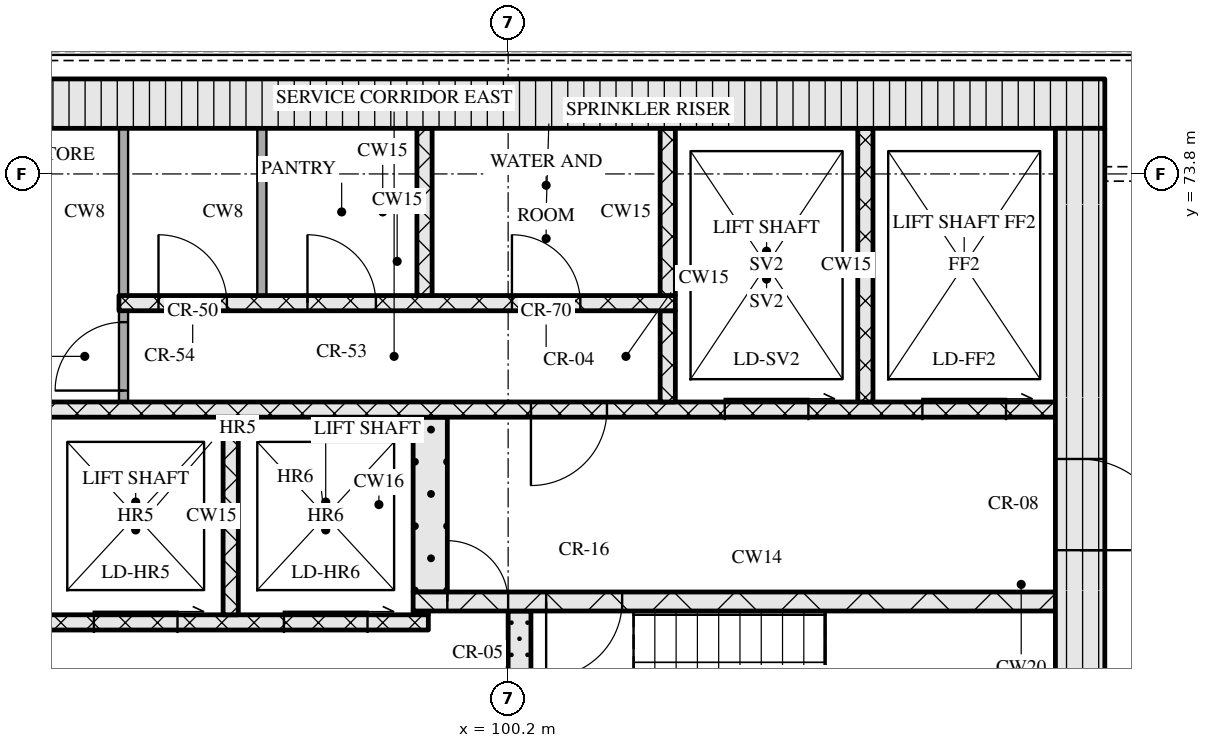
"""IFC4 building model, lengths in metres.
Left out: names, types, materials, properties, quantities, classifications, styles, units other than length and angle.
Written with IfcOpenShell. Run it as: python <this file> out.ifc"""

import sys

from ifc_helpers import new_model, si_unit, direction, frame, frame_2d, origin, place, context, subcontext, project, spatial, rectangle, extrude, element, fill, save


model = new_model("IFC4")
c1 = context("Model", 3, precision=1e-05, world=origin(), true_north=direction((0.0, 1.0)))
c2 = subcontext(c1, "Body", "Model", "MODEL_VIEW")
j1 = project(units=[si_unit("LENGTHUNIT", "METRE"), si_unit("PLANEANGLEUNIT", "RADIAN")], contexts=[c1])
p1 = place(None, origin())
s1 = spatial("IfcSite", under=j1, at=p1, CompositionType="ELEMENT")
p2 = place(p1, origin())
s2 = spatial("IfcBuilding", under=s1, at=p2, CompositionType="ELEMENT")
p3 = place(p2, frame((0.0, 0.0, 227.1)))
s3 = spatial("IfcBuildingStorey", under=s2, at=p3, CompositionType="ELEMENT", Elevation=227.1)
p4 = place(p3, frame((67.15, 74.725, 0.0), z_axis=(0.0, 0.0, 1.0), x_axis=(1.0, 0.0, 0.0)))
e1 = element("IfcWall", 1, at=p4, inside=s3, PredefinedType="SOLIDWALL", context=c2, shape_type="SweptSolid", body=[
    extrude(rectangle(XDim=40.9, YDim=0.65, at=frame_2d((20.45, 0.0))), origin(), (0.0, 0.0, 1.0), 3.32),
])
p5 = place(p3, frame((107.725, 62.4, 0.0), z_axis=(0.0, 0.0, 1.0), x_axis=(0.0, 1.0, 0.0)))
e2 = element("IfcWall", 2, at=p5, inside=s3, PredefinedType="SOLIDWALL", context=c2, shape_type="SweptSolid", body=[
    extrude(rectangle(XDim=12.0, YDim=0.65, at=frame_2d((6.0, 0.0))), origin(), (0.0, 0.0, 1.0), 3.32),
])
p6 = place(p5, frame((6.45, 0.0, 0.0)))
e3 = element("IfcOpeningElement", 3, at=p6, cuts=e2, PredefinedType="OPENING", context=c2, shape_type="SweptSolid", body=[
    extrude(rectangle(XDim=1.2, YDim=2.1, at=frame_2d((0.6, 1.05))), frame((0.0, 0.335, 0.0), z_axis=(0.0, -1.0, 0.0), x_axis=(1.0, 0.0, 0.0)), (0.0, 0.0, 1.0), 0.67),
])
p7 = place(p3, frame((100.35, 65.2, 0.0), z_axis=(0.0, 0.0, 1.0), x_axis=(0.0, 1.0, 0.0)))
e4 = element("IfcWall", 4, at=p7, inside=s3, PredefinedType="SOLIDWALL", context=c2, shape_type="SweptSolid", body=[
    extrude(rectangle(XDim=2.85, YDim=0.3, at=frame_2d((1.425, 0.0))), origin(), (0.0, 0.0, 1.0), 3.32),
])
p8 = place(p3, frame((76.05, 67.9, 0.0), z_axis=(0.0, 0.0, 1.0), x_axis=(1.0, 0.0, 0.0)))
e5 = element("IfcWall", 5, at=p8, inside=s3, PredefinedType="SOLIDWALL", context=c2, shape_type="SweptSolid", body=[
    extrude(rectangle(XDim=23.1, YDim=0.2, at=frame_2d((11.55, 0.0))), origin(), (0.0, 0.0, 1.0), 3.32),
])
p9 = place(p8, frame((1.35, 0.0, 0.0)))
e6 = element("IfcOpeningElement", 6, at=p9, cuts=e5, PredefinedType="OPENING", context=c2, shape_type="SweptSolid", body=[
    extrude(rectangle(XDim=0.9, YDim=2.1, at=frame_2d((0.45, 1.05))), frame((0.0, 0.11, 0.0), z_axis=(0.0, -1.0, 0.0), x_axis=(1.0, 0.0, 0.0)), (0.0, 0.0, 1.0), 0.22),
])
p10 = place(p8, frame((5.06, 0.0, 0.0)))
e7 = element("IfcOpeningElement", 7, at=p10, cuts=e5, PredefinedType="OPENING", context=c2, shape_type="SweptSolid", body=[
    extrude(rectangle(XDim=0.9, YDim=2.1, at=frame_2d((0.45, 1.05))), frame((0.0, 0.11, 0.0), z_axis=(0.0, -1.0, 0.0), x_axis=(1.0, 0.0, 0.0)), (0.0, 0.0, 1.0), 0.22),
])
p11 = place(p8, frame((8.45, 0.0, 0.0)))
e8 = element("IfcOpeningElement", 8, at=p11, cuts=e5, PredefinedType="OPENING", context=c2, shape_type="SweptSolid", body=[
    extrude(rectangle(XDim=0.9, YDim=2.1, at=frame_2d((0.45, 1.05))), frame((0.0, 0.11, 0.0), z_axis=(0.0, -1.0, 0.0), x_axis=(1.0, 0.0, 0.0)), (0.0, 0.0, 1.0), 0.22),
])
p12 = place(p8, frame((10.91, 0.0, 0.0)))
e9 = element("IfcOpeningElement", 9, at=p12, cuts=e5, PredefinedType="OPENING", context=c2, shape_type="SweptSolid", body=[
    extrude(rectangle(XDim=0.9, YDim=2.1, at=frame_2d((0.45, 1.05))), frame((0.0, 0.11, 0.0), z_axis=(0.0, -1.0, 0.0), x_axis=(1.0, 0.0, 0.0)), (0.0, 0.0, 1.0), 0.22),
])
p13 = place(p8, frame((13.55, 0.0, 0.0)))
e10 = element("IfcOpeningElement", 10, at=p13, cuts=e5, PredefinedType="OPENING", context=c2, shape_type="SweptSolid", body=[
    extrude(rectangle(XDim=1.0, YDim=2.1, at=frame_2d((0.5, 1.05))), frame((0.0, 0.11, 0.0), z_axis=(0.0, -1.0, 0.0), x_axis=(1.0, 0.0, 0.0)), (0.0, 0.0, 1.0), 0.22),
])
p14 = place(p8, frame((16.2, 0.0, 0.0)))
e11 = element("IfcOpeningElement", 11, at=p14, cuts=e5, PredefinedType="OPENING", context=c2, shape_type="SweptSolid", body=[
    extrude(rectangle(XDim=1.1, YDim=2.1, at=frame_2d((0.55, 1.05))), frame((0.0, 0.11, 0.0), z_axis=(0.0, -1.0, 0.0), x_axis=(1.0, 0.0, 0.0)), (0.0, 0.0, 1.0), 0.22),
])
p15 = place(p8, frame((18.7, 0.0, 0.0)))
e12 = element("IfcOpeningElement", 12, at=p15, cuts=e5, PredefinedType="OPENING", context=c2, shape_type="SweptSolid", body=[
    extrude(rectangle(XDim=1.1, YDim=2.1, at=frame_2d((0.55, 1.05))), frame((0.0, 0.11, 0.0), z_axis=(0.0, -1.0, 0.0), x_axis=(1.0, 0.0, 0.0)), (0.0, 0.0, 1.0), 0.22),
])
p16 = place(p8, frame((21.2, 0.0, 0.0)))
e13 = element("IfcOpeningElement", 13, at=p16, cuts=e5, PredefinedType="OPENING", context=c2, shape_type="SweptSolid", body=[
    extrude(rectangle(XDim=1.1, YDim=2.1, at=frame_2d((0.55, 1.05))), frame((0.0, 0.11, 0.0), z_axis=(0.0, -1.0, 0.0), x_axis=(1.0, 0.0, 0.0)), (0.0, 0.0, 1.0), 0.22),
])
p17 = place(p3, frame((96.55, 68.0, 0.0), z_axis=(0.0, 0.0, 1.0), x_axis=(0.0, 1.0, 0.0)))
e14 = element("IfcWall", 14, at=p17, inside=s3, PredefinedType="SOLIDWALL", context=c2, shape_type="SweptSolid", body=[
    extrude(rectangle(XDim=2.6, YDim=0.2, at=frame_2d((1.3, 0.0))), origin(), (0.0, 0.0, 1.0), 3.32),
])
p18 = place(p3, frame((98.95, 68.025, 0.0), z_axis=(0.0, 0.0, 1.0), x_axis=(1.0, 0.0, 0.0)))
e15 = element("IfcWall", 15, at=p18, inside=s3, PredefinedType="SOLIDWALL", context=c2, shape_type="SweptSolid", body=[
    extrude(rectangle(XDim=0.2, YDim=0.05, at=frame_2d((0.1, 0.0))), origin(), (0.0, 0.0, 1.0), 3.32),
])
p19 = place(p3, frame((98.95, 68.175, 0.0), z_axis=(0.0, 0.0, 1.0), x_axis=(1.0, 0.0, 0.0)))
e16 = element("IfcWall", 16, at=p19, inside=s3, PredefinedType="SOLIDWALL", context=c2, shape_type="SweptSolid", body=[
    extrude(rectangle(XDim=8.45, YDim=0.25, at=frame_2d((4.225, 0.0))), origin(), (0.0, 0.0, 1.0), 3.32),
])
p20 = place(p19, frame((0.45, 0.0, 0.0)))
e17 = element("IfcOpeningElement", 17, at=p20, cuts=e16, PredefinedType="OPENING", context=c2, shape_type="SweptSolid", body=[
    extrude(rectangle(XDim=0.8, YDim=2.1, at=frame_2d((0.4, 1.05))), frame((0.0, 0.135, 0.0), z_axis=(0.0, -1.0, 0.0), x_axis=(1.0, 0.0, 0.0)), (0.0, 0.0, 1.0), 0.27),
])
p21 = place(p19, frame((1.75, 0.0, 0.0)))
e18 = element("IfcOpeningElement", 18, at=p21, cuts=e16, PredefinedType="OPENING", context=c2, shape_type="SweptSolid", body=[
    extrude(rectangle(XDim=1.0, YDim=2.1, at=frame_2d((0.5, 1.05))), frame((0.0, 0.135, 0.0), z_axis=(0.0, -1.0, 0.0), x_axis=(1.0, 0.0, 0.0)), (0.0, 0.0, 1.0), 0.27),
])
p22 = place(p3, frame((99.175, 68.3, 0.0), z_axis=(0.0, 0.0, 1.0), x_axis=(0.0, 1.0, 0.0)))
e19 = element("IfcWall", 19, at=p22, inside=s3, PredefinedType="SOLIDWALL", context=c2, shape_type="SweptSolid", body=[
    extrude(rectangle(XDim=2.3, YDim=0.45, at=frame_2d((1.15, 0.0))), origin(), (0.0, 0.0, 1.0), 3.32),
])
p23 = place(p3, frame((67.8, 70.7, 0.0), z_axis=(0.0, 0.0, 1.0), x_axis=(1.0, 0.0, 0.0)))
e20 = element("IfcWall", 20, at=p23, inside=s3, PredefinedType="SOLIDWALL", context=c2, shape_type="SweptSolid", body=[
    extrude(rectangle(XDim=39.6, YDim=0.2, at=frame_2d((19.8, 0.0))), origin(), (0.0, 0.0, 1.0), 3.32),
])
p24 = place(p23, frame((0.65, 0.0, 0.0)))
e21 = element("IfcOpeningElement", 21, at=p24, cuts=e20, PredefinedType="OPENING", context=c2, shape_type="SweptSolid", body=[
    extrude(rectangle(XDim=1.1, YDim=2.1, at=frame_2d((0.55, 1.05))), frame((0.0, 0.11, 0.0), z_axis=(0.0, -1.0, 0.0), x_axis=(1.0, 0.0, 0.0)), (0.0, 0.0, 1.0), 0.22),
])
p25 = place(p23, frame((3.25, 0.0, 0.0)))
e22 = element("IfcOpeningElement", 22, at=p25, cuts=e20, PredefinedType="OPENING", context=c2, shape_type="SweptSolid", body=[
    extrude(rectangle(XDim=1.1, YDim=2.1, at=frame_2d((0.55, 1.05))), frame((0.0, 0.11, 0.0), z_axis=(0.0, -1.0, 0.0), x_axis=(1.0, 0.0, 0.0)), (0.0, 0.0, 1.0), 0.22),
])
p26 = place(p23, frame((5.9, 0.0, 0.0)))
e23 = element("IfcOpeningElement", 23, at=p26, cuts=e20, PredefinedType="OPENING", context=c2, shape_type="SweptSolid", body=[
    extrude(rectangle(XDim=1.0, YDim=2.1, at=frame_2d((0.5, 1.05))), frame((0.0, 0.11, 0.0), z_axis=(0.0, -1.0, 0.0), x_axis=(1.0, 0.0, 0.0)), (0.0, 0.0, 1.0), 0.22),
])
p27 = place(p23, frame((21.7, 0.0, 0.0)))
e24 = element("IfcOpeningElement", 24, at=p27, cuts=e20, PredefinedType="OPENING", context=c2, shape_type="SweptSolid", body=[
    extrude(rectangle(XDim=1.0, YDim=2.1, at=frame_2d((0.5, 1.05))), frame((0.0, 0.11, 0.0), z_axis=(0.0, -1.0, 0.0), x_axis=(1.0, 0.0, 0.0)), (0.0, 0.0, 1.0), 0.22),
])
p28 = place(p23, frame((32.7, 0.0, 0.0)))
e25 = element("IfcOpeningElement", 25, at=p28, cuts=e20, PredefinedType="OPENING", context=c2, shape_type="SweptSolid", body=[
    extrude(rectangle(XDim=1.0, YDim=2.1, at=frame_2d((0.5, 1.05))), frame((0.0, 0.11, 0.0), z_axis=(0.0, -1.0, 0.0), x_axis=(1.0, 0.0, 0.0)), (0.0, 0.0, 1.0), 0.22),
])
p29 = place(p23, frame((35.25, 0.0, 0.0)))
e26 = element("IfcOpeningElement", 26, at=p29, cuts=e20, PredefinedType="OPENING", context=c2, shape_type="SweptSolid", body=[
    extrude(rectangle(XDim=1.1, YDim=2.1, at=frame_2d((0.55, 1.05))), frame((0.0, 0.11, 0.0), z_axis=(0.0, -1.0, 0.0), x_axis=(1.0, 0.0, 0.0)), (0.0, 0.0, 1.0), 0.22),
])
p30 = place(p23, frame((37.85, 0.0, 0.0)))
e27 = element("IfcOpeningElement", 27, at=p30, cuts=e20, PredefinedType="OPENING", context=c2, shape_type="SweptSolid", body=[
    extrude(rectangle(XDim=1.1, YDim=2.1, at=frame_2d((0.55, 1.05))), frame((0.0, 0.11, 0.0), z_axis=(0.0, -1.0, 0.0), x_axis=(1.0, 0.0, 0.0)), (0.0, 0.0, 1.0), 0.22),
])
p31 = place(p3, frame((95.14, 70.8, 0.0), z_axis=(0.0, 0.0, 1.0), x_axis=(0.0, 1.0, 0.0)))
e28 = element("IfcWall", 28, at=p31, inside=s3, PredefinedType="PARTITIONING", context=c2, shape_type="SweptSolid", body=[
    extrude(rectangle(XDim=1.2, YDim=0.12, at=frame_2d((0.6, 0.0))), origin(), (0.0, 0.0, 1.0), 3.32),
])
p32 = place(p31, frame((0.15, 0.0, 0.0)))
e29 = element("IfcOpeningElement", 29, at=p32, cuts=e28, PredefinedType="OPENING", context=c2, shape_type="SweptSolid", body=[
    extrude(rectangle(XDim=0.9, YDim=2.1, at=frame_2d((0.45, 1.05))), frame((0.0, 0.07, 0.0), z_axis=(0.0, -1.0, 0.0), x_axis=(1.0, 0.0, 0.0)), (0.0, 0.0, 1.0), 0.14),
])
p33 = place(p3, frame((102.3, 70.8, 0.0), z_axis=(0.0, 0.0, 1.0), x_axis=(0.0, 1.0, 0.0)))
e30 = element("IfcWall", 30, at=p33, inside=s3, PredefinedType="SOLIDWALL", context=c2, shape_type="SweptSolid", body=[
    extrude(rectangle(XDim=1.2, YDim=0.2, at=frame_2d((0.6, 0.0))), origin(), (0.0, 0.0, 1.0), 3.32),
])
p34 = place(p3, frame((104.9, 70.8, 0.0), z_axis=(0.0, 0.0, 1.0), x_axis=(0.0, 1.0, 0.0)))
e31 = element("IfcWall", 31, at=p34, inside=s3, PredefinedType="SOLIDWALL", context=c2, shape_type="SweptSolid", body=[
    extrude(rectangle(XDim=3.6, YDim=0.2, at=frame_2d((1.8, 0.0))), origin(), (0.0, 0.0, 1.0), 3.32),
])
p35 = place(p3, frame((95.08, 72.1, 0.0), z_axis=(0.0, 0.0, 1.0), x_axis=(1.0, 0.0, 0.0)))
e32 = element("IfcWall", 32, at=p35, inside=s3, PredefinedType="SOLIDWALL", context=c2, shape_type="SweptSolid", body=[
    extrude(rectangle(XDim=7.32, YDim=0.2, at=frame_2d((3.66, 0.0))), origin(), (0.0, 0.0, 1.0), 3.32),
])
p36 = place(p35, frame((0.52, 0.0, 0.0)))
e33 = element("IfcOpeningElement", 33, at=p36, cuts=e32, PredefinedType="OPENING", context=c2, shape_type="SweptSolid", body=[
    extrude(rectangle(XDim=0.9, YDim=2.1, at=frame_2d((0.45, 1.05))), frame((0.0, 0.11, 0.0), z_axis=(0.0, -1.0, 0.0), x_axis=(1.0, 0.0, 0.0)), (0.0, 0.0, 1.0), 0.22),
])
p37 = place(p35, frame((2.48, 0.0, 0.0)))
e34 = element("IfcOpeningElement", 34, at=p37, cuts=e32, PredefinedType="OPENING", context=c2, shape_type="SweptSolid", body=[
    extrude(rectangle(XDim=0.9, YDim=2.1, at=frame_2d((0.45, 1.05))), frame((0.0, 0.11, 0.0), z_axis=(0.0, -1.0, 0.0), x_axis=(1.0, 0.0, 0.0)), (0.0, 0.0, 1.0), 0.22),
])
p38 = place(p35, frame((5.17, 0.0, 0.0)))
e35 = element("IfcOpeningElement", 35, at=p38, cuts=e32, PredefinedType="OPENING", context=c2, shape_type="SweptSolid", body=[
    extrude(rectangle(XDim=0.9, YDim=2.1, at=frame_2d((0.45, 1.05))), frame((0.0, 0.11, 0.0), z_axis=(0.0, -1.0, 0.0), x_axis=(1.0, 0.0, 0.0)), (0.0, 0.0, 1.0), 0.22),
])
for number, where, z_axis, x_axis in (
    (36, (95.14, 72.2, 0.0), (0.0, 0.0, 1.0), (0.0, 1.0, 0.0)),
    (37, (96.96, 72.2, 0.0), (0.0, 0.0, 1.0), (0.0, 1.0, 0.0)),
):
    element("IfcWall", number, at=place(p3, frame(where, z_axis=z_axis, x_axis=x_axis)), inside=s3, PredefinedType="PARTITIONING", context=c2, shape_type="SweptSolid", body=[
        extrude(rectangle(XDim=2.2, YDim=0.12, at=frame_2d((1.1, 0.0))), origin(), (0.0, 0.0, 1.0), 3.32),
    ])
for number, where, z_axis, x_axis in (
    (38, (99.1, 72.2, 0.0), (0.0, 0.0, 1.0), (0.0, 1.0, 0.0)),
    (39, (102.3, 72.2, 0.0), (0.0, 0.0, 1.0), (0.0, 1.0, 0.0)),
):
    element("IfcWall", number, at=place(p3, frame(where, z_axis=z_axis, x_axis=x_axis)), inside=s3, PredefinedType="SOLIDWALL", context=c2, shape_type="SweptSolid", body=[
        extrude(rectangle(XDim=2.2, YDim=0.2, at=frame_2d((1.1, 0.0))), origin(), (0.0, 0.0, 1.0), 3.32),
    ])
p39 = place(p15, origin())
e40 = element("IfcDoor", 40, at=p39, inside=s3, OperationType="SLIDING_TO_RIGHT", PredefinedType="DOOR", context=c2, shape_type="SweptSolid", body=[
    extrude(rectangle(XDim=1.1, YDim=2.1, at=frame_2d((0.55, 1.05))), frame((0.0, 0.025, 0.0), z_axis=(0.0, -1.0, 0.0), x_axis=(1.0, 0.0, 0.0)), (0.0, 0.0, 1.0), 0.05),
])
fill(e12, e40)
p40 = place(p16, origin())
e41 = element("IfcDoor", 41, at=p40, inside=s3, OperationType="SLIDING_TO_RIGHT", PredefinedType="DOOR", context=c2, shape_type="SweptSolid", body=[
    extrude(rectangle(XDim=1.1, YDim=2.1, at=frame_2d((0.55, 1.05))), frame((0.0, 0.025, 0.0), z_axis=(0.0, -1.0, 0.0), x_axis=(1.0, 0.0, 0.0)), (0.0, 0.0, 1.0), 0.05),
])
fill(e13, e41)
p41 = place(p20, origin())
e42 = element("IfcDoor", 42, at=p41, inside=s3, OperationType="SINGLE_SWING_LEFT", PredefinedType="DOOR", context=c2, shape_type="SweptSolid", body=[
    extrude(rectangle(XDim=0.8, YDim=2.1, at=frame_2d((0.4, 1.05))), frame((0.0, 0.025, 0.0), z_axis=(0.0, -1.0, 0.0), x_axis=(1.0, 0.0, 0.0)), (0.0, 0.0, 1.0), 0.05),
])
fill(e17, e42)
p42 = place(p21, origin())
e43 = element("IfcDoor", 43, at=p42, inside=s3, OperationType="SINGLE_SWING_RIGHT", PredefinedType="DOOR", context=c2, shape_type="SweptSolid", body=[
    extrude(rectangle(XDim=1.0, YDim=2.1, at=frame_2d((0.5, 1.05))), frame((0.0, 0.025, 0.0), z_axis=(0.0, -1.0, 0.0), x_axis=(1.0, 0.0, 0.0)), (0.0, 0.0, 1.0), 0.05),
])
fill(e18, e43)
p43 = place(p6, origin())
e44 = element("IfcDoor", 44, at=p43, inside=s3, OperationType="SINGLE_SWING_RIGHT", PredefinedType="DOOR", context=c2, shape_type="SweptSolid", body=[
    extrude(rectangle(XDim=1.2, YDim=2.1, at=frame_2d((0.6, 1.05))), frame((0.0, 0.025, 0.0), z_axis=(0.0, -1.0, 0.0), x_axis=(1.0, 0.0, 0.0)), (0.0, 0.0, 1.0), 0.05),
])
fill(e3, e44)
p44 = place(p28, origin())
e45 = element("IfcDoor", 45, at=p44, inside=s3, OperationType="SINGLE_SWING_RIGHT", PredefinedType="DOOR", context=c2, shape_type="SweptSolid", body=[
    extrude(rectangle(XDim=1.0, YDim=2.1, at=frame_2d((0.5, 1.05))), frame((0.0, 0.025, 0.0), z_axis=(0.0, -1.0, 0.0), x_axis=(1.0, 0.0, 0.0)), (0.0, 0.0, 1.0), 0.05),
])
fill(e25, e45)
p45 = place(p29, origin())
e46 = element("IfcDoor", 46, at=p45, inside=s3, OperationType="SLIDING_TO_RIGHT", PredefinedType="DOOR", context=c2, shape_type="SweptSolid", body=[
    extrude(rectangle(XDim=1.1, YDim=2.1, at=frame_2d((0.55, 1.05))), frame((0.0, 0.025, 0.0), z_axis=(0.0, -1.0, 0.0), x_axis=(1.0, 0.0, 0.0)), (0.0, 0.0, 1.0), 0.05),
])
fill(e26, e46)
p46 = place(p30, origin())
e47 = element("IfcDoor", 47, at=p46, inside=s3, OperationType="SLIDING_TO_RIGHT", PredefinedType="DOOR", context=c2, shape_type="SweptSolid", body=[
    extrude(rectangle(XDim=1.1, YDim=2.1, at=frame_2d((0.55, 1.05))), frame((0.0, 0.025, 0.0), z_axis=(0.0, -1.0, 0.0), x_axis=(1.0, 0.0, 0.0)), (0.0, 0.0, 1.0), 0.05),
])
fill(e27, e47)
p47 = place(p32, origin())
e48 = element("IfcDoor", 48, at=p47, inside=s3, OperationType="SINGLE_SWING_LEFT", PredefinedType="DOOR", context=c2, shape_type="SweptSolid", body=[
    extrude(rectangle(XDim=0.9, YDim=2.1, at=frame_2d((0.45, 1.05))), frame((0.0, 0.025, 0.0), z_axis=(0.0, -1.0, 0.0), x_axis=(1.0, 0.0, 0.0)), (0.0, 0.0, 1.0), 0.05),
])
fill(e29, e48)
p48 = place(p36, origin())
e49 = element("IfcDoor", 49, at=p48, inside=s3, OperationType="SINGLE_SWING_LEFT", PredefinedType="DOOR", context=c2, shape_type="SweptSolid", body=[
    extrude(rectangle(XDim=0.9, YDim=2.1, at=frame_2d((0.45, 1.05))), frame((0.0, 0.025, 0.0), z_axis=(0.0, -1.0, 0.0), x_axis=(1.0, 0.0, 0.0)), (0.0, 0.0, 1.0), 0.05),
])
fill(e33, e49)
p49 = place(p37, origin())
e50 = element("IfcDoor", 50, at=p49, inside=s3, OperationType="SINGLE_SWING_LEFT", PredefinedType="DOOR", context=c2, shape_type="SweptSolid", body=[
    extrude(rectangle(XDim=0.9, YDim=2.1, at=frame_2d((0.45, 1.05))), frame((0.0, 0.025, 0.0), z_axis=(0.0, -1.0, 0.0), x_axis=(1.0, 0.0, 0.0)), (0.0, 0.0, 1.0), 0.05),
])
fill(e34, e50)
p50 = place(p38, origin())
e51 = element("IfcDoor", 51, at=p50, inside=s3, OperationType="SINGLE_SWING_LEFT", PredefinedType="DOOR", context=c2, shape_type="SweptSolid", body=[
    extrude(rectangle(XDim=0.9, YDim=2.1, at=frame_2d((0.45, 1.05))), frame((0.0, 0.025, 0.0), z_axis=(0.0, -1.0, 0.0), x_axis=(1.0, 0.0, 0.0)), (0.0, 0.0, 1.0), 0.05),
])
fill(e35, e51)
save(model, sys.argv[1])
